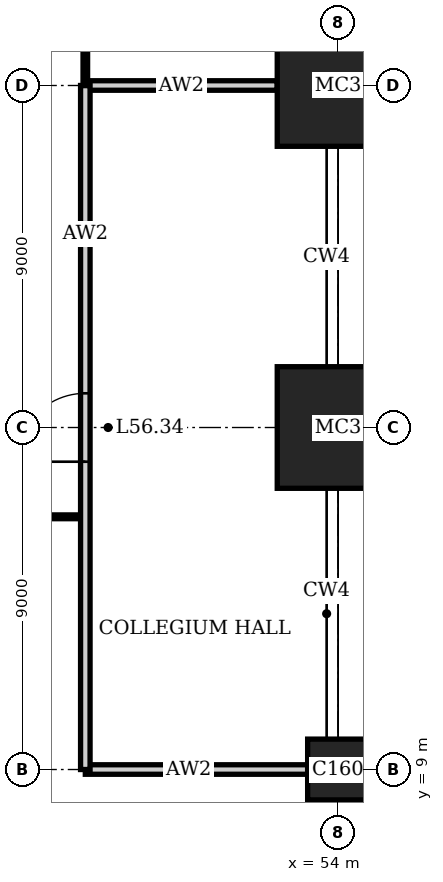
"""IFC4 building model, lengths in metres.
Left out: names, types, materials, properties, quantities, classifications, styles, units other than length and angle.
Written with IfcOpenShell. Run it as: python <this file> out.ifc"""

import sys

from ifc_helpers import new_model, si_unit, direction, frame, frame_2d, origin, origin_2d, place, context, subcontext, project, spatial, rectangle, extrude, element, fill, save


model = new_model("IFC4")
c1 = context("Model", 3, precision=1e-05, world=origin(), true_north=direction((0.0, 1.0)))
c2 = subcontext(c1, "Body", "Model", "MODEL_VIEW")
j1 = project(units=[si_unit("LENGTHUNIT", "METRE"), si_unit("PLANEANGLEUNIT", "RADIAN")], contexts=[c1])
p1 = place(None, origin())
s1 = spatial("IfcSite", under=j1, at=p1, CompositionType="ELEMENT")
p2 = place(p1, origin())
s2 = spatial("IfcBuilding", under=s1, at=p2, CompositionType="ELEMENT")
p3 = place(p2, frame((0.0, 0.0, 230.2)))
s3 = spatial("IfcBuildingStorey", under=s2, at=p3, CompositionType="ELEMENT", Elevation=230.2)
p4 = place(p3, frame((54.0, 9.0, 0.0), z_axis=(0.0, 0.0, 1.0), x_axis=(1.0, 0.0, 0.0)))
e1 = element("IfcColumn", 1, at=p4, inside=s3, PredefinedType="COLUMN", context=c2, shape_type="SweptSolid", body=[
    extrude(rectangle(XDim=1.6, YDim=1.6, at=origin_2d()), origin(), (0.0, 0.0, 1.0), 4.2),
])
for number, where, z_axis, x_axis in (
    (2, (54.0, 18.0, 0.0), (0.0, 0.0, 1.0), (1.0, 0.0, 0.0)),
    (3, (54.0, 27.0, 0.0), (0.0, 0.0, 1.0), (1.0, 0.0, 0.0)),
):
    element("IfcColumn", number, at=place(p3, frame(where, z_axis=z_axis, x_axis=x_axis)), inside=s3, PredefinedType="COLUMN", context=c2, shape_type="SweptSolid", body=[
        extrude(rectangle(XDim=3.2, YDim=3.2, at=origin_2d()), origin(), (0.0, 0.0, 1.0), 4.2),
    ])
p5 = place(p3, frame((47.35, 9.0, 0.0), z_axis=(0.0, 0.0, 1.0), x_axis=(1.0, 0.0, 0.0)))
e4 = element("IfcWall", 4, at=p5, inside=s3, PredefinedType="PARTITIONING", context=c2, shape_type="SweptSolid", body=[
    extrude(rectangle(XDim=5.85, YDim=0.25, at=frame_2d((2.925, 0.0))), origin(), (0.0, 0.0, 1.0), 3.05),
])
p6 = place(p3, frame((31.5, 15.65, 0.0), z_axis=(0.0, 0.0, 1.0), x_axis=(1.0, 0.0, 0.0)))
e5 = element("IfcWall", 5, at=p6, inside=s3, PredefinedType="PARTITIONING", context=c2, shape_type="SweptSolid", body=[
    extrude(rectangle(XDim=15.85, YDim=0.1, at=frame_2d((7.925, 0.0))), origin(), (0.0, 0.0, 1.0), 3.85),
])
p7 = place(p6, frame((7.425, 0.0, 0.0)))
e6 = element("IfcOpeningElement", 6, at=p7, cuts=e5, PredefinedType="OPENING", context=c2, shape_type="SweptSolid", body=[
    extrude(rectangle(XDim=1.0, YDim=2.4, at=frame_2d((0.5, 1.2))), frame((0.0, 0.06, 0.0), z_axis=(0.0, -1.0, 0.0), x_axis=(1.0, 0.0, 0.0)), (0.0, 0.0, 1.0), 0.12),
])
p8 = place(p3, frame((47.35, 27.0, 0.0), z_axis=(0.0, 0.0, 1.0), x_axis=(1.0, 0.0, 0.0)))
e7 = element("IfcWall", 7, at=p8, inside=s3, PredefinedType="PARTITIONING", context=c2, shape_type="SweptSolid", body=[
    extrude(rectangle(XDim=5.05, YDim=0.25, at=frame_2d((2.525, 0.0))), origin(), (0.0, 0.0, 1.0), 3.25),
])
p9 = place(p3, frame((47.35, 9.0, 0.0), z_axis=(0.0, 0.0, 1.0), x_axis=(0.0, 1.0, 0.0)))
e8 = element("IfcWall", 8, at=p9, inside=s3, PredefinedType="PARTITIONING", context=c2, shape_type="SweptSolid", body=[
    extrude(rectangle(XDim=18.0, YDim=0.25, at=frame_2d((9.0, 0.0))), origin(), (0.0, 0.0, 1.0), 3.85),
])
p10 = place(p9, frame((8.1, 0.0, 0.0)))
e9 = element("IfcOpeningElement", 9, at=p10, cuts=e8, PredefinedType="OPENING", context=c2, shape_type="SweptSolid", body=[
    extrude(rectangle(XDim=1.8, YDim=2.4, at=frame_2d((0.9, 1.2))), frame((0.0, 0.135, 0.0), z_axis=(0.0, -1.0, 0.0), x_axis=(1.0, 0.0, 0.0)), (0.0, 0.0, 1.0), 0.27),
])
p11 = place(p3, frame((47.35, 27.0, 0.0), z_axis=(0.0, 0.0, 1.0), x_axis=(0.0, 1.0, 0.0)))
e10 = element("IfcWall", 10, at=p11, inside=s3, PredefinedType="PARTITIONING", context=c2, shape_type="SweptSolid", body=[
    extrude(rectangle(XDim=9.0, YDim=0.12, at=frame_2d((4.5, 0.0))), origin(), (0.0, 0.0, 1.0), 3.85),
])
p12 = place(p11, frame((4.0, 0.0, 0.0)))
e11 = element("IfcOpeningElement", 11, at=p12, cuts=e10, PredefinedType="OPENING", context=c2, shape_type="SweptSolid", body=[
    extrude(rectangle(XDim=1.0, YDim=2.4, at=frame_2d((0.5, 1.2))), frame((0.0, 0.07, 0.0), z_axis=(0.0, -1.0, 0.0), x_axis=(1.0, 0.0, 0.0)), (0.0, 0.0, 1.0), 0.14),
])
p13 = place(p10, origin())
e12 = element("IfcDoor", 12, at=p13, inside=s3, OperationType="DOUBLE_DOOR_SINGLE_SWING", PredefinedType="DOOR", context=c2, shape_type="SweptSolid", body=[
    extrude(rectangle(XDim=1.8, YDim=2.4, at=frame_2d((0.9, 1.2))), frame((0.0, 0.025, 0.0), z_axis=(0.0, -1.0, 0.0), x_axis=(1.0, 0.0, 0.0)), (0.0, 0.0, 1.0), 0.05),
])
fill(e9, e12)
save(model, sys.argv[1])
